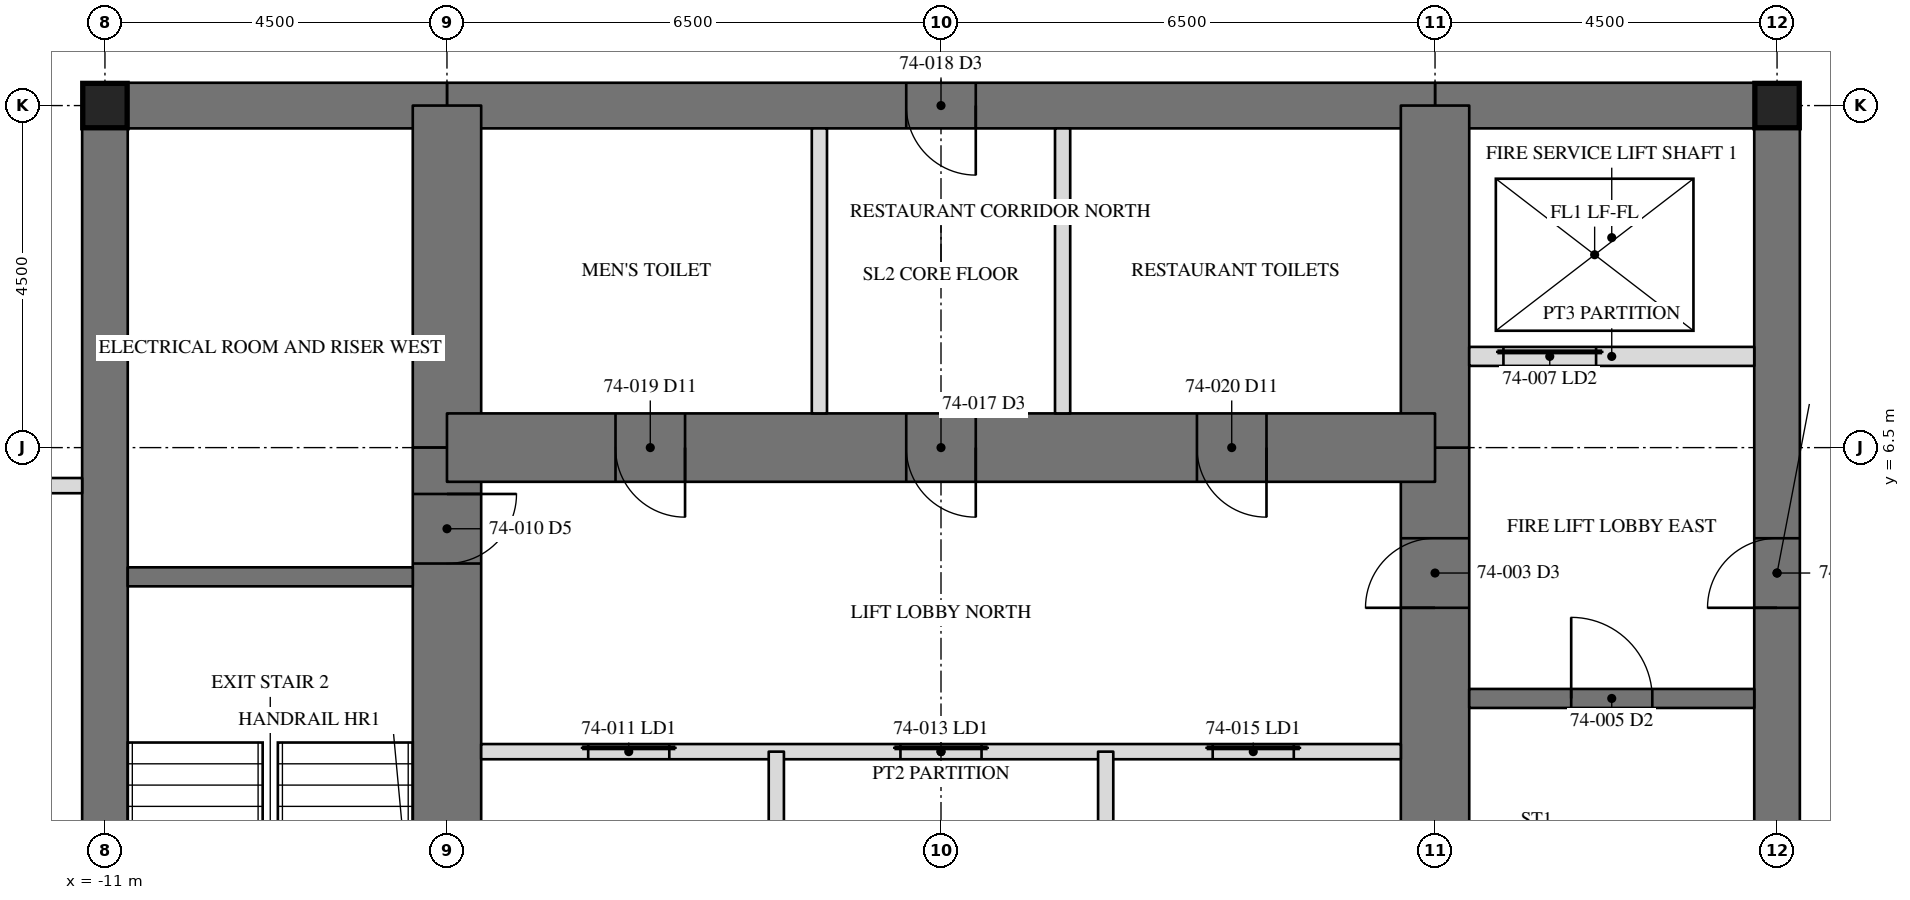
"""IFC4 building model, lengths in metres.
Left out: names, types, materials, properties, quantities, classifications, styles, units other than length and angle.
Written with IfcOpenShell. Run it as: python <this file> out.ifc"""

import sys

from ifc_helpers import new_model, si_unit, direction, frame, frame_2d, origin, origin_2d, place, context, subcontext, project, spatial, rectangle, hollow_rectangle, extrude, element, fill, save


model = new_model("IFC4")
c1 = context("Model", 3, precision=1e-05, world=origin(), true_north=direction((0.0, 1.0)))
c2 = subcontext(c1, "Body", "Model", "MODEL_VIEW")
j1 = project(units=[si_unit("LENGTHUNIT", "METRE"), si_unit("PLANEANGLEUNIT", "RADIAN")], contexts=[c1])
p1 = place(None, origin())
s1 = spatial("IfcSite", under=j1, at=p1, CompositionType="ELEMENT")
p2 = place(p1, origin())
s2 = spatial("IfcBuilding", under=s1, at=p2, CompositionType="ELEMENT")
p3 = place(p2, frame((0.0, 0.0, 299.2)))
s3 = spatial("IfcBuildingStorey", under=s2, at=p3, CompositionType="ELEMENT", Elevation=299.2)
p4 = place(p3, frame((11.0, -11.0, 0.0), z_axis=(0.0, 0.0, 1.0), x_axis=(0.0, 1.0, 0.0)))
e1 = element("IfcWall", 1, at=p4, inside=s3, PredefinedType="SHEAR", context=c2, shape_type="SweptSolid", body=[
    extrude(rectangle(XDim=22.0, YDim=0.6, at=frame_2d((11.0, 0.0))), origin(), (0.0, 0.0, 1.0), 5.0),
])
p5 = place(p4, frame((15.393, 0.0, 0.0)))
e2 = element("IfcOpeningElement", 2, at=p5, cuts=e1, PredefinedType="OPENING", context=c2, shape_type="SweptSolid", body=[
    extrude(rectangle(XDim=0.915, YDim=2.134, at=frame_2d((0.458, 1.067))), frame((0.0, 0.31, 0.0), z_axis=(0.0, -1.0, 0.0), x_axis=(1.0, 0.0, 0.0)), (0.0, 0.0, 1.0), 0.62),
])
p6 = place(p3, frame((-11.0, 11.0, 0.0), z_axis=(0.0, 0.0, 1.0), x_axis=(0.0, -1.0, 0.0)))
e3 = element("IfcWall", 3, at=p6, inside=s3, PredefinedType="SHEAR", context=c2, shape_type="SweptSolid", body=[
    extrude(rectangle(XDim=22.0, YDim=0.6, at=frame_2d((11.0, 0.0))), origin(), (0.0, 0.0, 1.0), 5.0),
])
p7 = place(p6, frame((15.393, 0.0, 0.0)))
e4 = element("IfcOpeningElement", 4, at=p7, cuts=e3, PredefinedType="OPENING", context=c2, shape_type="SweptSolid", body=[
    extrude(rectangle(XDim=0.915, YDim=2.134, at=frame_2d((0.458, 1.067))), frame((0.0, 0.31, 0.0), z_axis=(0.0, -1.0, 0.0), x_axis=(1.0, 0.0, 0.0)), (0.0, 0.0, 1.0), 0.62),
])
p8 = place(p3, frame((11.0, 11.0, 0.0), z_axis=(0.0, 0.0, 1.0), x_axis=(-1.0, 0.0, 0.0)))
e5 = element("IfcWall", 5, at=p8, inside=s3, PredefinedType="SHEAR", context=c2, shape_type="SweptSolid", body=[
    extrude(rectangle(XDim=4.5, YDim=0.6, at=frame_2d((2.25, 0.0))), origin(), (0.0, 0.0, 1.0), 5.0),
])
p9 = place(p3, frame((6.5, 11.0, 0.0), z_axis=(0.0, 0.0, 1.0), x_axis=(-1.0, 0.0, 0.0)))
e6 = element("IfcWall", 6, at=p9, inside=s3, PredefinedType="SHEAR", context=c2, shape_type="SweptSolid", body=[
    extrude(rectangle(XDim=13.0, YDim=0.6, at=frame_2d((6.5, 0.0))), origin(), (0.0, 0.0, 1.0), 5.0),
])
p10 = place(p9, frame((6.042, 0.0, 0.0)))
e7 = element("IfcOpeningElement", 7, at=p10, cuts=e6, PredefinedType="OPENING", context=c2, shape_type="SweptSolid", body=[
    extrude(rectangle(XDim=0.915, YDim=2.134, at=frame_2d((0.458, 1.067))), frame((0.0, 0.31, 0.0), z_axis=(0.0, -1.0, 0.0), x_axis=(1.0, 0.0, 0.0)), (0.0, 0.0, 1.0), 0.62),
])
p11 = place(p3, frame((-6.5, 11.0, 0.0), z_axis=(0.0, 0.0, 1.0), x_axis=(-1.0, 0.0, 0.0)))
e8 = element("IfcWall", 8, at=p11, inside=s3, PredefinedType="SHEAR", context=c2, shape_type="SweptSolid", body=[
    extrude(rectangle(XDim=4.5, YDim=0.6, at=frame_2d((2.25, 0.0))), origin(), (0.0, 0.0, 1.0), 5.0),
])
p12 = place(p3, frame((6.5, -6.5, 0.0), z_axis=(0.0, 0.0, 1.0), x_axis=(0.0, 1.0, 0.0)))
e9 = element("IfcWall", 9, at=p12, inside=s3, PredefinedType="SHEAR", context=c2, shape_type="SweptSolid", body=[
    extrude(rectangle(XDim=13.0, YDim=0.9, at=frame_2d((6.5, 0.0))), origin(), (0.0, 0.0, 1.0), 5.0),
])
p13 = place(p12, frame((10.893, 0.0, 0.0)))
e10 = element("IfcOpeningElement", 10, at=p13, cuts=e9, PredefinedType="OPENING", context=c2, shape_type="SweptSolid", body=[
    extrude(rectangle(XDim=0.915, YDim=2.134, at=frame_2d((0.458, 1.067))), frame((0.0, 0.46, 0.0), z_axis=(0.0, -1.0, 0.0), x_axis=(1.0, 0.0, 0.0)), (0.0, 0.0, 1.0), 0.92),
])
p14 = place(p12, frame((0.61, 0.0, 0.0)))
e11 = element("IfcOpeningElement", 11, at=p14, cuts=e9, PredefinedType="OPENING", context=c2, shape_type="SweptSolid", body=[
    extrude(rectangle(XDim=0.915, YDim=2.134, at=frame_2d((0.458, 1.067))), frame((0.0, 0.46, 0.0), z_axis=(0.0, -1.0, 0.0), x_axis=(1.0, 0.0, 0.0)), (0.0, 0.0, 1.0), 0.92),
])
for number, where, z_axis, x_axis in (
    (12, (6.5, 6.5, 0.0), (0.0, 0.0, 1.0), (0.0, 1.0, 0.0)),
    (13, (-6.5, 11.0, 0.0), (0.0, 0.0, 1.0), (0.0, -1.0, 0.0)),
):
    element("IfcWall", number, at=place(p3, frame(where, z_axis=z_axis, x_axis=x_axis)), inside=s3, PredefinedType="SHEAR", context=c2, shape_type="SweptSolid", body=[
        extrude(rectangle(XDim=4.5, YDim=0.9, at=frame_2d((2.25, 0.0))), origin(), (0.0, 0.0, 1.0), 5.0),
    ])
p15 = place(p3, frame((-6.5, 6.5, 0.0), z_axis=(0.0, 0.0, 1.0), x_axis=(0.0, -1.0, 0.0)))
e14 = element("IfcWall", 14, at=p15, inside=s3, PredefinedType="SHEAR", context=c2, shape_type="SweptSolid", body=[
    extrude(rectangle(XDim=13.0, YDim=0.9, at=frame_2d((6.5, 0.0))), origin(), (0.0, 0.0, 1.0), 5.0),
])
p16 = place(p15, frame((10.893, 0.0, 0.0)))
e15 = element("IfcOpeningElement", 15, at=p16, cuts=e14, PredefinedType="OPENING", context=c2, shape_type="SweptSolid", body=[
    extrude(rectangle(XDim=0.915, YDim=2.134, at=frame_2d((0.458, 1.067))), frame((0.0, 0.46, 0.0), z_axis=(0.0, -1.0, 0.0), x_axis=(1.0, 0.0, 0.0)), (0.0, 0.0, 1.0), 0.92),
])
p17 = place(p15, frame((0.61, 0.0, 0.0)))
e16 = element("IfcOpeningElement", 16, at=p17, cuts=e14, PredefinedType="OPENING", context=c2, shape_type="SweptSolid", body=[
    extrude(rectangle(XDim=0.915, YDim=2.134, at=frame_2d((0.458, 1.067))), frame((0.0, 0.46, 0.0), z_axis=(0.0, -1.0, 0.0), x_axis=(1.0, 0.0, 0.0)), (0.0, 0.0, 1.0), 0.92),
])
p18 = place(p3, frame((6.5, 6.5, 0.0), z_axis=(0.0, 0.0, 1.0), x_axis=(-1.0, 0.0, 0.0)))
e17 = element("IfcWall", 17, at=p18, inside=s3, PredefinedType="SHEAR", context=c2, shape_type="SweptSolid", body=[
    extrude(rectangle(XDim=13.0, YDim=0.9, at=frame_2d((6.5, 0.0))), origin(), (0.0, 0.0, 1.0), 5.0),
])
p19 = place(p18, frame((6.042, 0.0, 0.0)))
e18 = element("IfcOpeningElement", 18, at=p19, cuts=e17, PredefinedType="OPENING", context=c2, shape_type="SweptSolid", body=[
    extrude(rectangle(XDim=0.915, YDim=2.134, at=frame_2d((0.458, 1.067))), frame((0.0, 0.46, 0.0), z_axis=(0.0, -1.0, 0.0), x_axis=(1.0, 0.0, 0.0)), (0.0, 0.0, 1.0), 0.92),
])
p20 = place(p18, frame((9.867, 0.0, 0.0)))
e19 = element("IfcOpeningElement", 19, at=p20, cuts=e17, PredefinedType="OPENING", context=c2, shape_type="SweptSolid", body=[
    extrude(rectangle(XDim=0.915, YDim=2.134, at=frame_2d((0.458, 1.067))), frame((0.0, 0.46, 0.0), z_axis=(0.0, -1.0, 0.0), x_axis=(1.0, 0.0, 0.0)), (0.0, 0.0, 1.0), 0.92),
])
p21 = place(p18, frame((2.218, 0.0, 0.0)))
e20 = element("IfcOpeningElement", 20, at=p21, cuts=e17, PredefinedType="OPENING", context=c2, shape_type="SweptSolid", body=[
    extrude(rectangle(XDim=0.915, YDim=2.134, at=frame_2d((0.458, 1.067))), frame((0.0, 0.46, 0.0), z_axis=(0.0, -1.0, 0.0), x_axis=(1.0, 0.0, 0.0)), (0.0, 0.0, 1.0), 0.92),
])
for number, where, z_axis, x_axis in (
    (21, (11.0, 11.0, 0.0), (0.0, 0.0, 1.0), (1.0, 0.0, 0.0)),
    (22, (-11.0, 11.0, 0.0), (0.0, 0.0, 1.0), (1.0, 0.0, 0.0)),
):
    element("IfcColumn", number, at=place(p3, frame(where, z_axis=z_axis, x_axis=x_axis)), inside=s3, PredefinedType="COLUMN", context=c2, shape_type="SweptSolid", body=[
        extrude(hollow_rectangle(XDim=0.584, YDim=0.584, WallThickness=0.051, at=origin_2d()), origin(), (0.0, 0.0, 1.0), 5.0),
    ])
p22 = place(p3, frame((-6.95, 4.8, 0.0), z_axis=(0.0, 0.0, 1.0), x_axis=(-1.0, 0.0, 0.0)))
e23 = element("IfcWall", 23, at=p22, inside=s3, PredefinedType="SOLIDWALL", context=c2, shape_type="SweptSolid", body=[
    extrude(rectangle(XDim=3.75, YDim=0.25, at=frame_2d((1.875, 0.0))), origin(), (0.0, 0.0, 1.0), 4.81),
])
p23 = place(p3, frame((6.95, 3.2, 0.0), z_axis=(0.0, 0.0, 1.0), x_axis=(1.0, 0.0, 0.0)))
e24 = element("IfcWall", 24, at=p23, inside=s3, PredefinedType="SOLIDWALL", context=c2, shape_type="SweptSolid", body=[
    extrude(rectangle(XDim=3.75, YDim=0.25, at=frame_2d((1.875, 0.0))), origin(), (0.0, 0.0, 1.0), 4.81),
])
p24 = place(p23, frame((1.342, 0.0, 0.0)))
e25 = element("IfcOpeningElement", 25, at=p24, cuts=e24, PredefinedType="OPENING", context=c2, shape_type="SweptSolid", body=[
    extrude(rectangle(XDim=1.067, YDim=2.134, at=frame_2d((0.533, 1.067))), frame((0.0, 0.135, 0.0), z_axis=(0.0, -1.0, 0.0), x_axis=(1.0, 0.0, 0.0)), (0.0, 0.0, 1.0), 0.27),
])
p25 = place(p3, frame((6.95, 7.7, 0.0), z_axis=(0.0, 0.0, 1.0), x_axis=(1.0, 0.0, 0.0)))
e26 = element("IfcWall", 26, at=p25, inside=s3, PredefinedType="PARTITIONING", context=c2, shape_type="SweptSolid", body=[
    extrude(rectangle(XDim=3.75, YDim=0.25, at=frame_2d((1.875, 0.0))), origin(), (0.0, 0.0, 1.0), 4.81),
])
p26 = place(p25, frame((0.45, 0.0, 0.0)))
e27 = element("IfcOpeningElement", 27, at=p26, cuts=e26, PredefinedType="OPENING", context=c2, shape_type="SweptSolid", body=[
    extrude(rectangle(XDim=1.219, YDim=2.134, at=frame_2d((0.609, 1.067))), frame((0.0, 0.135, 0.0), z_axis=(0.0, -1.0, 0.0), x_axis=(1.0, 0.0, 0.0)), (0.0, 0.0, 1.0), 0.27),
])
p27 = place(p3, frame((-6.05, 2.5, 0.0), z_axis=(0.0, 0.0, 1.0), x_axis=(1.0, 0.0, 0.0)))
e28 = element("IfcWall", 28, at=p27, inside=s3, PredefinedType="PARTITIONING", context=c2, shape_type="SweptSolid", body=[
    extrude(rectangle(XDim=12.1, YDim=0.2, at=frame_2d((6.05, 0.0))), origin(), (0.0, 0.0, 1.0), 4.81),
])
p28 = place(p27, frame((1.408, 0.0, 0.0)))
e29 = element("IfcOpeningElement", 29, at=p28, cuts=e28, PredefinedType="OPENING", context=c2, shape_type="SweptSolid", body=[
    extrude(rectangle(XDim=1.067, YDim=2.134, at=frame_2d((0.533, 1.067))), frame((0.0, 0.11, 0.0), z_axis=(0.0, -1.0, 0.0), x_axis=(1.0, 0.0, 0.0)), (0.0, 0.0, 1.0), 0.22),
])
p29 = place(p27, frame((5.517, 0.0, 0.0)))
e30 = element("IfcOpeningElement", 30, at=p29, cuts=e28, PredefinedType="OPENING", context=c2, shape_type="SweptSolid", body=[
    extrude(rectangle(XDim=1.067, YDim=2.134, at=frame_2d((0.533, 1.067))), frame((0.0, 0.11, 0.0), z_axis=(0.0, -1.0, 0.0), x_axis=(1.0, 0.0, 0.0)), (0.0, 0.0, 1.0), 0.22),
])
p30 = place(p27, frame((9.625, 0.0, 0.0)))
e31 = element("IfcOpeningElement", 31, at=p30, cuts=e28, PredefinedType="OPENING", context=c2, shape_type="SweptSolid", body=[
    extrude(rectangle(XDim=1.067, YDim=2.134, at=frame_2d((0.533, 1.067))), frame((0.0, 0.11, 0.0), z_axis=(0.0, -1.0, 0.0), x_axis=(1.0, 0.0, 0.0)), (0.0, 0.0, 1.0), 0.22),
])
for number, where, z_axis, x_axis in (
    (32, (-2.167, -2.5, 0.0), (0.0, 0.0, 1.0), (0.0, 1.0, 0.0)),
    (33, (2.167, -2.5, 0.0), (0.0, 0.0, 1.0), (0.0, 1.0, 0.0)),
):
    element("IfcWall", number, at=place(p3, frame(where, z_axis=z_axis, x_axis=x_axis)), inside=s3, PredefinedType="PARTITIONING", context=c2, shape_type="SweptSolid", body=[
        extrude(rectangle(XDim=5.0, YDim=0.2, at=frame_2d((2.5, 0.0))), origin(), (0.0, 0.0, 1.0), 4.81),
    ])
for number, where, z_axis, x_axis in (
    (34, (-1.6, 6.95, 0.0), (0.0, 0.0, 1.0), (0.0, 1.0, 0.0)),
    (35, (1.6, 6.95, 0.0), (0.0, 0.0, 1.0), (0.0, 1.0, 0.0)),
):
    element("IfcWall", number, at=place(p3, frame(where, z_axis=z_axis, x_axis=x_axis)), inside=s3, PredefinedType="PARTITIONING", context=c2, shape_type="SweptSolid", body=[
        extrude(rectangle(XDim=3.75, YDim=0.2, at=frame_2d((1.875, 0.0))), origin(), (0.0, 0.0, 1.0), 4.81),
    ])
p31 = place(p3, frame((-11.3, 6.0, 0.0), z_axis=(0.0, 0.0, 1.0), x_axis=(-1.0, 0.0, 0.0)))
e36 = element("IfcWall", 36, at=p31, inside=s3, PredefinedType="PARTITIONING", context=c2, shape_type="SweptSolid", body=[
    extrude(rectangle(XDim=5.665, YDim=0.2, at=frame_2d((2.833, 0.0))), origin(), (0.0, 0.0, 1.0), 4.81),
])
p32 = place(p31, frame((2.268, 0.0, 0.0)))
e37 = element("IfcOpeningElement", 37, at=p32, cuts=e36, PredefinedType="OPENING", context=c2, shape_type="SweptSolid", body=[
    extrude(rectangle(XDim=0.915, YDim=2.134, at=frame_2d((0.458, 1.067))), frame((0.0, 0.11, 0.0), z_axis=(0.0, -1.0, 0.0), x_axis=(1.0, 0.0, 0.0)), (0.0, 0.0, 1.0), 0.22),
])
p33 = place(p5, origin())
e38 = element("IfcDoor", 38, at=p33, inside=s3, OperationType="SINGLE_SWING_RIGHT", PredefinedType="DOOR", context=c2, shape_type="SweptSolid", body=[
    extrude(rectangle(XDim=0.915, YDim=2.134, at=frame_2d((0.458, 1.067))), frame((0.0, -0.225, 0.0), z_axis=(0.0, -1.0, 0.0), x_axis=(1.0, 0.0, 0.0)), (0.0, 0.0, 1.0), 0.05),
])
fill(e2, e38)
p34 = place(p13, origin())
e39 = element("IfcDoor", 39, at=p34, inside=s3, OperationType="SINGLE_SWING_RIGHT", PredefinedType="DOOR", context=c2, shape_type="SweptSolid", body=[
    extrude(rectangle(XDim=0.915, YDim=2.134, at=frame_2d((0.458, 1.067))), frame((0.0, -0.375, 0.0), z_axis=(0.0, -1.0, 0.0), x_axis=(1.0, 0.0, 0.0)), (0.0, 0.0, 1.0), 0.05),
])
fill(e10, e39)
p35 = place(p24, origin())
e40 = element("IfcDoor", 40, at=p35, inside=s3, OperationType="SINGLE_SWING_LEFT", PredefinedType="DOOR", context=c2, shape_type="SweptSolid", body=[
    extrude(rectangle(XDim=1.067, YDim=2.134, at=frame_2d((0.533, 1.067))), frame((0.0, 0.025, 0.0), z_axis=(0.0, -1.0, 0.0), x_axis=(1.0, 0.0, 0.0)), (0.0, 0.0, 1.0), 0.05),
])
fill(e25, e40)
p36 = place(p26, origin())
e41 = element("IfcDoor", 41, at=p36, inside=s3, OperationType="SLIDING_TO_LEFT", PredefinedType="DOOR", context=c2, shape_type="SweptSolid", body=[
    extrude(rectangle(XDim=1.219, YDim=2.134, at=frame_2d((0.609, 1.067))), frame((0.0, 0.025, 0.0), z_axis=(0.0, -1.0, 0.0), x_axis=(1.0, 0.0, 0.0)), (0.0, 0.0, 1.0), 0.05),
])
fill(e27, e41)
p37 = place(p17, origin())
e42 = element("IfcDoor", 42, at=p37, inside=s3, OperationType="SINGLE_SWING_RIGHT", PredefinedType="DOOR", context=c2, shape_type="SweptSolid", body=[
    extrude(rectangle(XDim=0.915, YDim=2.134, at=frame_2d((0.458, 1.067))), frame((0.0, -0.375, 0.0), z_axis=(0.0, -1.0, 0.0), x_axis=(1.0, 0.0, 0.0)), (0.0, 0.0, 1.0), 0.05),
])
fill(e16, e42)
p38 = place(p28, origin())
e43 = element("IfcDoor", 43, at=p38, inside=s3, OperationType="SLIDING_TO_LEFT", PredefinedType="DOOR", context=c2, shape_type="SweptSolid", body=[
    extrude(rectangle(XDim=1.067, YDim=2.134, at=frame_2d((0.533, 1.067))), frame((0.0, 0.025, 0.0), z_axis=(0.0, -1.0, 0.0), x_axis=(1.0, 0.0, 0.0)), (0.0, 0.0, 1.0), 0.05),
])
fill(e29, e43)
p39 = place(p29, origin())
e44 = element("IfcDoor", 44, at=p39, inside=s3, OperationType="SLIDING_TO_LEFT", PredefinedType="DOOR", context=c2, shape_type="SweptSolid", body=[
    extrude(rectangle(XDim=1.067, YDim=2.134, at=frame_2d((0.533, 1.067))), frame((0.0, 0.025, 0.0), z_axis=(0.0, -1.0, 0.0), x_axis=(1.0, 0.0, 0.0)), (0.0, 0.0, 1.0), 0.05),
])
fill(e30, e44)
p40 = place(p30, origin())
e45 = element("IfcDoor", 45, at=p40, inside=s3, OperationType="SLIDING_TO_LEFT", PredefinedType="DOOR", context=c2, shape_type="SweptSolid", body=[
    extrude(rectangle(XDim=1.067, YDim=2.134, at=frame_2d((0.533, 1.067))), frame((0.0, 0.025, 0.0), z_axis=(0.0, -1.0, 0.0), x_axis=(1.0, 0.0, 0.0)), (0.0, 0.0, 1.0), 0.05),
])
fill(e31, e45)
p41 = place(p19, origin())
e46 = element("IfcDoor", 46, at=p41, inside=s3, OperationType="SINGLE_SWING_RIGHT", PredefinedType="DOOR", context=c2, shape_type="SweptSolid", body=[
    extrude(rectangle(XDim=0.915, YDim=2.134, at=frame_2d((0.458, 1.067))), frame((0.0, -0.375, 0.0), z_axis=(0.0, -1.0, 0.0), x_axis=(1.0, 0.0, 0.0)), (0.0, 0.0, 1.0), 0.05),
])
fill(e18, e46)
p42 = place(p10, origin())
e47 = element("IfcDoor", 47, at=p42, inside=s3, OperationType="SINGLE_SWING_RIGHT", PredefinedType="DOOR", context=c2, shape_type="SweptSolid", body=[
    extrude(rectangle(XDim=0.915, YDim=2.134, at=frame_2d((0.458, 1.067))), frame((0.0, -0.225, 0.0), z_axis=(0.0, -1.0, 0.0), x_axis=(1.0, 0.0, 0.0)), (0.0, 0.0, 1.0), 0.05),
])
fill(e7, e47)
p43 = place(p20, origin())
e48 = element("IfcDoor", 48, at=p43, inside=s3, OperationType="SINGLE_SWING_LEFT", PredefinedType="DOOR", context=c2, shape_type="SweptSolid", body=[
    extrude(rectangle(XDim=0.915, YDim=2.134, at=frame_2d((0.458, 1.067))), frame((0.0, -0.375, 0.0), z_axis=(0.0, -1.0, 0.0), x_axis=(1.0, 0.0, 0.0)), (0.0, 0.0, 1.0), 0.05),
])
fill(e19, e48)
p44 = place(p21, origin())
e49 = element("IfcDoor", 49, at=p44, inside=s3, OperationType="SINGLE_SWING_LEFT", PredefinedType="DOOR", context=c2, shape_type="SweptSolid", body=[
    extrude(rectangle(XDim=0.915, YDim=2.134, at=frame_2d((0.458, 1.067))), frame((0.0, -0.375, 0.0), z_axis=(0.0, -1.0, 0.0), x_axis=(1.0, 0.0, 0.0)), (0.0, 0.0, 1.0), 0.05),
])
fill(e20, e49)
save(model, sys.argv[1])
